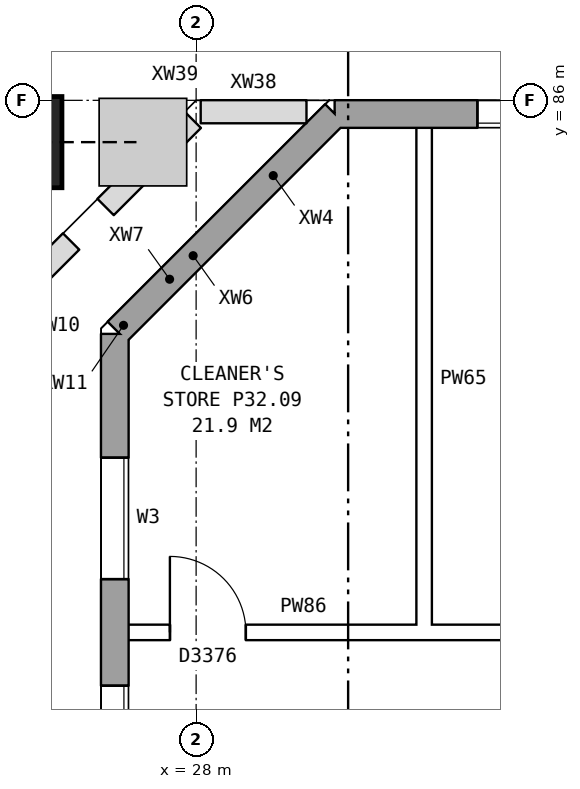
"""IFC4 building model, lengths in metres.
Left out: names, types, materials, properties, quantities, classifications, styles, units other than length and angle.
Written with IfcOpenShell. Run it as: python <this file> out.ifc"""

import sys

from ifc_helpers import new_model, si_unit, direction, frame, frame_2d, origin, origin_2d, place, context, subcontext, project, spatial, rectangle, hollow_rectangle, extrude, element, fill, save


model = new_model("IFC4")
c1 = context("Model", 3, precision=1e-05, world=origin(), true_north=direction((0.0, 1.0)))
c2 = subcontext(c1, "Body", "Model", "MODEL_VIEW")
j1 = project(units=[si_unit("LENGTHUNIT", "METRE"), si_unit("PLANEANGLEUNIT", "RADIAN")], contexts=[c1])
p1 = place(None, origin())
s1 = spatial("IfcSite", under=j1, at=p1, CompositionType="ELEMENT")
p2 = place(p1, origin())
s2 = spatial("IfcBuilding", under=s1, at=p2, CompositionType="ELEMENT")
p3 = place(p2, frame((0.0, 0.0, 115.0)))
s3 = spatial("IfcBuildingStorey", under=s2, at=p3, CompositionType="ELEMENT", Elevation=115.0)
p4 = place(p3, frame((25.635, 85.45, 0.218), z_axis=(0.362446261155, 0.0, 0.932004671541), x_axis=(0.0, 1.0, 0.0)))
e1 = element("IfcColumn", 1, at=p4, inside=s3, PredefinedType="COLUMN", context=c2, shape_type="SweptSolid", body=[
    extrude(hollow_rectangle(XDim=1.2, YDim=1.2, WallThickness=0.065, at=origin_2d()), origin(), (0.0, 0.0, 1.0), 4.362),
])
p5 = place(p3, frame((72.925, 85.82, 0.0), z_axis=(0.0, 0.0, 1.0), x_axis=(-1.0, 0.0, 0.0)))
e2 = element("IfcWall", 2, at=p5, inside=s3, PredefinedType="STANDARD", context=c2, shape_type="SweptSolid", body=[
    extrude(rectangle(XDim=43.101, YDim=0.36, at=frame_2d((21.55, 0.0))), origin(), (0.0, 0.0, 1.0), 4.2),
])
p6 = place(p5, frame((2.6, 0.0, 1.5)))
e3 = element("IfcOpeningElement", 3, at=p6, cuts=e2, PredefinedType="OPENING", context=c2, shape_type="SweptSolid", body=[
    extrude(rectangle(XDim=0.6, YDim=1.2, at=frame_2d((0.3, 0.6))), frame((0.0, 0.19, 0.0), z_axis=(0.0, -1.0, 0.0), x_axis=(1.0, 0.0, 0.0)), (0.0, 0.0, 1.0), 0.38),
])
p7 = place(p5, frame((3.625, 0.0, 1.5)))
e4 = element("IfcOpeningElement", 4, at=p7, cuts=e2, PredefinedType="OPENING", context=c2, shape_type="SweptSolid", body=[
    extrude(rectangle(XDim=1.6, YDim=1.2, at=frame_2d((0.8, 0.6))), frame((0.0, 0.19, 0.0), z_axis=(0.0, -1.0, 0.0), x_axis=(1.0, 0.0, 0.0)), (0.0, 0.0, 1.0), 0.38),
])
p8 = place(p5, frame((7.6, 0.0, 1.5)))
e5 = element("IfcOpeningElement", 5, at=p8, cuts=e2, PredefinedType="OPENING", context=c2, shape_type="SweptSolid", body=[
    extrude(rectangle(XDim=0.9, YDim=1.2, at=frame_2d((0.45, 0.6))), frame((0.0, 0.19, 0.0), z_axis=(0.0, -1.0, 0.0), x_axis=(1.0, 0.0, 0.0)), (0.0, 0.0, 1.0), 0.38),
])
p9 = place(p5, frame((9.625, 0.0, 1.5)))
e6 = element("IfcOpeningElement", 6, at=p9, cuts=e2, PredefinedType="OPENING", context=c2, shape_type="SweptSolid", body=[
    extrude(rectangle(XDim=1.6, YDim=1.2, at=frame_2d((0.8, 0.6))), frame((0.0, 0.19, 0.0), z_axis=(0.0, -1.0, 0.0), x_axis=(1.0, 0.0, 0.0)), (0.0, 0.0, 1.0), 0.38),
])
p10 = place(p5, frame((11.525, 0.0, 1.5)))
e7 = element("IfcOpeningElement", 7, at=p10, cuts=e2, PredefinedType="OPENING", context=c2, shape_type="SweptSolid", body=[
    extrude(rectangle(XDim=0.6, YDim=1.2, at=frame_2d((0.3, 0.6))), frame((0.0, 0.19, 0.0), z_axis=(0.0, -1.0, 0.0), x_axis=(1.0, 0.0, 0.0)), (0.0, 0.0, 1.0), 0.38),
])
p11 = place(p5, frame((15.625, 0.0, 1.5)))
e8 = element("IfcOpeningElement", 8, at=p11, cuts=e2, PredefinedType="OPENING", context=c2, shape_type="SweptSolid", body=[
    extrude(rectangle(XDim=1.6, YDim=1.2, at=frame_2d((0.8, 0.6))), frame((0.0, 0.19, 0.0), z_axis=(0.0, -1.0, 0.0), x_axis=(1.0, 0.0, 0.0)), (0.0, 0.0, 1.0), 0.38),
])
p12 = place(p5, frame((20.075, 0.0, 1.5)))
e9 = element("IfcOpeningElement", 9, at=p12, cuts=e2, PredefinedType="OPENING", context=c2, shape_type="SweptSolid", body=[
    extrude(rectangle(XDim=1.2, YDim=1.2, at=frame_2d((0.6, 0.6))), frame((0.0, 0.19, 0.0), z_axis=(0.0, -1.0, 0.0), x_axis=(1.0, 0.0, 0.0)), (0.0, 0.0, 1.0), 0.38),
])
p13 = place(p5, frame((21.625, 0.0, 1.5)))
e10 = element("IfcOpeningElement", 10, at=p13, cuts=e2, PredefinedType="OPENING", context=c2, shape_type="SweptSolid", body=[
    extrude(rectangle(XDim=1.6, YDim=1.2, at=frame_2d((0.8, 0.6))), frame((0.0, 0.19, 0.0), z_axis=(0.0, -1.0, 0.0), x_axis=(1.0, 0.0, 0.0)), (0.0, 0.0, 1.0), 0.38),
])
p14 = place(p5, frame((24.125, 0.0, 1.5)))
e11 = element("IfcOpeningElement", 11, at=p14, cuts=e2, PredefinedType="OPENING", context=c2, shape_type="SweptSolid", body=[
    extrude(rectangle(XDim=0.6, YDim=1.2, at=frame_2d((0.3, 0.6))), frame((0.0, 0.19, 0.0), z_axis=(0.0, -1.0, 0.0), x_axis=(1.0, 0.0, 0.0)), (0.0, 0.0, 1.0), 0.38),
])
p15 = place(p5, frame((27.625, 0.0, 1.5)))
e12 = element("IfcOpeningElement", 12, at=p15, cuts=e2, PredefinedType="OPENING", context=c2, shape_type="SweptSolid", body=[
    extrude(rectangle(XDim=1.6, YDim=1.2, at=frame_2d((0.8, 0.6))), frame((0.0, 0.19, 0.0), z_axis=(0.0, -1.0, 0.0), x_axis=(1.0, 0.0, 0.0)), (0.0, 0.0, 1.0), 0.38),
])
p16 = place(p5, frame((32.525, 0.0, 1.5)))
e13 = element("IfcOpeningElement", 13, at=p16, cuts=e2, PredefinedType="OPENING", context=c2, shape_type="SweptSolid", body=[
    extrude(rectangle(XDim=0.6, YDim=1.2, at=frame_2d((0.3, 0.6))), frame((0.0, 0.19, 0.0), z_axis=(0.0, -1.0, 0.0), x_axis=(1.0, 0.0, 0.0)), (0.0, 0.0, 1.0), 0.38),
])
p17 = place(p5, frame((33.625, 0.0, 1.5)))
e14 = element("IfcOpeningElement", 14, at=p17, cuts=e2, PredefinedType="OPENING", context=c2, shape_type="SweptSolid", body=[
    extrude(rectangle(XDim=1.6, YDim=1.2, at=frame_2d((0.8, 0.6))), frame((0.0, 0.19, 0.0), z_axis=(0.0, -1.0, 0.0), x_axis=(1.0, 0.0, 0.0)), (0.0, 0.0, 1.0), 0.38),
])
p18 = place(p5, frame((36.125, 0.0, 1.5)))
e15 = element("IfcOpeningElement", 15, at=p18, cuts=e2, PredefinedType="OPENING", context=c2, shape_type="SweptSolid", body=[
    extrude(rectangle(XDim=0.9, YDim=1.2, at=frame_2d((0.45, 0.6))), frame((0.0, 0.19, 0.0), z_axis=(0.0, -1.0, 0.0), x_axis=(1.0, 0.0, 0.0)), (0.0, 0.0, 1.0), 0.38),
])
p19 = place(p5, frame((39.625, 0.0, 1.5)))
e16 = element("IfcOpeningElement", 16, at=p19, cuts=e2, PredefinedType="OPENING", context=c2, shape_type="SweptSolid", body=[
    extrude(rectangle(XDim=1.6, YDim=1.2, at=frame_2d((0.8, 0.6))), frame((0.0, 0.19, 0.0), z_axis=(0.0, -1.0, 0.0), x_axis=(1.0, 0.0, 0.0)), (0.0, 0.0, 1.0), 0.38),
])
p20 = place(p3, frame((29.825, 85.82, 0.0), z_axis=(0.0, 0.0, 1.0), x_axis=(-0.707106781187, -0.707106781187, 0.0)))
e17 = element("IfcWall", 17, at=p20, inside=s3, PredefinedType="STANDARD", context=c2, shape_type="SweptSolid", body=[
    extrude(rectangle(XDim=2.291, YDim=0.36, at=frame_2d((1.146, 0.0))), origin(), (0.0, 0.0, 1.0), 4.2),
])
p21 = place(p3, frame((28.205, 84.2, 0.0), z_axis=(0.0, 0.0, 1.0), x_axis=(-0.707106781187, -0.707106781187, 0.0)))
e18 = element("IfcWall", 18, at=p21, inside=s3, PredefinedType="STANDARD", context=c2, shape_type="SweptSolid", body=[
    extrude(rectangle(XDim=0.69, YDim=0.36, at=frame_2d((0.345, 0.0))), origin(), (0.0, 0.0, 1.0), 3.397),
])
p22 = place(p3, frame((27.717, 83.712, 0.0), z_axis=(0.0, 0.0, 1.0), x_axis=(-0.707106781187, -0.707106781187, 0.0)))
e19 = element("IfcWall", 19, at=p22, inside=s3, PredefinedType="STANDARD", context=c2, shape_type="SweptSolid", body=[
    extrude(rectangle(XDim=0.186, YDim=0.36, at=frame_2d((0.093, 0.0))), origin(), (0.0, 0.0, 1.0), 4.2),
])
p23 = place(p3, frame((27.585, 83.581, 0.953), z_axis=(0.0, 0.0, 1.0), x_axis=(-0.707106781187, -0.707106781187, 0.0)))
e20 = element("IfcWall", 20, at=p23, inside=s3, PredefinedType="STANDARD", context=c2, shape_type="SweptSolid", body=[
    extrude(rectangle(XDim=0.652, YDim=0.36, at=frame_2d((0.326, 0.0))), origin(), (0.0, 0.0, 1.0), 3.247),
])
p24 = place(p3, frame((27.124, 83.119, 0.0), z_axis=(0.0, 0.0, 1.0), x_axis=(-0.707106781187, -0.707106781187, 0.0)))
e21 = element("IfcWall", 21, at=p24, inside=s3, PredefinedType="STANDARD", context=c2, shape_type="SweptSolid", body=[
    extrude(rectangle(XDim=0.224, YDim=0.36, at=frame_2d((0.112, 0.0))), origin(), (0.0, 0.0, 1.0), 4.2),
])
p25 = place(p3, frame((26.93, 82.925, 0.0), z_axis=(0.0, 0.0, 1.0), x_axis=(0.0, -1.0, 0.0)))
e22 = element("IfcWall", 22, at=p25, inside=s3, PredefinedType="STANDARD", context=c2, shape_type="SweptSolid", body=[
    extrude(rectangle(XDim=25.851, YDim=0.36, at=frame_2d((12.925, 0.0))), origin(), (0.0, 0.0, 1.0), 4.2),
])
p26 = place(p25, frame((1.625, 0.0, 1.5)))
e23 = element("IfcOpeningElement", 23, at=p26, cuts=e22, PredefinedType="OPENING", context=c2, shape_type="SweptSolid", body=[
    extrude(rectangle(XDim=1.6, YDim=1.2, at=frame_2d((0.8, 0.6))), frame((0.0, 0.19, 0.0), z_axis=(0.0, -1.0, 0.0), x_axis=(1.0, 0.0, 0.0)), (0.0, 0.0, 1.0), 0.38),
])
p27 = place(p25, frame((4.625, 0.0, 1.5)))
e24 = element("IfcOpeningElement", 24, at=p27, cuts=e22, PredefinedType="OPENING", context=c2, shape_type="SweptSolid", body=[
    extrude(rectangle(XDim=1.6, YDim=1.2, at=frame_2d((0.8, 0.6))), frame((0.0, 0.19, 0.0), z_axis=(0.0, -1.0, 0.0), x_axis=(1.0, 0.0, 0.0)), (0.0, 0.0, 1.0), 0.38),
])
p28 = place(p25, frame((8.775, 0.0, 1.5)))
e25 = element("IfcOpeningElement", 25, at=p28, cuts=e22, PredefinedType="OPENING", context=c2, shape_type="SweptSolid", body=[
    extrude(rectangle(XDim=0.6, YDim=1.2, at=frame_2d((0.3, 0.6))), frame((0.0, 0.19, 0.0), z_axis=(0.0, -1.0, 0.0), x_axis=(1.0, 0.0, 0.0)), (0.0, 0.0, 1.0), 0.38),
])
p29 = place(p25, frame((9.675, 0.0, 1.5)))
e26 = element("IfcOpeningElement", 26, at=p29, cuts=e22, PredefinedType="OPENING", context=c2, shape_type="SweptSolid", body=[
    extrude(rectangle(XDim=1.2, YDim=1.2, at=frame_2d((0.6, 0.6))), frame((0.0, 0.19, 0.0), z_axis=(0.0, -1.0, 0.0), x_axis=(1.0, 0.0, 0.0)), (0.0, 0.0, 1.0), 0.38),
])
p30 = place(p25, frame((13.625, 0.0, 1.5)))
e27 = element("IfcOpeningElement", 27, at=p30, cuts=e22, PredefinedType="OPENING", context=c2, shape_type="SweptSolid", body=[
    extrude(rectangle(XDim=1.6, YDim=1.2, at=frame_2d((0.8, 0.6))), frame((0.0, 0.19, 0.0), z_axis=(0.0, -1.0, 0.0), x_axis=(1.0, 0.0, 0.0)), (0.0, 0.0, 1.0), 0.38),
])
p31 = place(p25, frame((16.625, 0.0, 1.5)))
e28 = element("IfcOpeningElement", 28, at=p31, cuts=e22, PredefinedType="OPENING", context=c2, shape_type="SweptSolid", body=[
    extrude(rectangle(XDim=1.6, YDim=1.2, at=frame_2d((0.8, 0.6))), frame((0.0, 0.19, 0.0), z_axis=(0.0, -1.0, 0.0), x_axis=(1.0, 0.0, 0.0)), (0.0, 0.0, 1.0), 0.38),
])
p32 = place(p25, frame((21.125, 0.0, 1.5)))
e29 = element("IfcOpeningElement", 29, at=p32, cuts=e22, PredefinedType="OPENING", context=c2, shape_type="SweptSolid", body=[
    extrude(rectangle(XDim=0.6, YDim=1.2, at=frame_2d((0.3, 0.6))), frame((0.0, 0.19, 0.0), z_axis=(0.0, -1.0, 0.0), x_axis=(1.0, 0.0, 0.0)), (0.0, 0.0, 1.0), 0.38),
])
p33 = place(p25, frame((22.325, 0.0, 1.5)))
e30 = element("IfcOpeningElement", 30, at=p33, cuts=e22, PredefinedType="OPENING", context=c2, shape_type="SweptSolid", body=[
    extrude(rectangle(XDim=0.9, YDim=1.2, at=frame_2d((0.45, 0.6))), frame((0.0, 0.19, 0.0), z_axis=(0.0, -1.0, 0.0), x_axis=(1.0, 0.0, 0.0)), (0.0, 0.0, 1.0), 0.38),
])
p34 = place(p25, frame((15.525, 0.0, 1.5)))
e31 = element("IfcOpeningElement", 31, at=p34, cuts=e22, PredefinedType="OPENING", context=c2, shape_type="SweptSolid", body=[
    extrude(rectangle(XDim=0.6, YDim=1.2, at=frame_2d((0.3, 0.6))), frame((0.0, 0.19, 0.0), z_axis=(0.0, -1.0, 0.0), x_axis=(1.0, 0.0, 0.0)), (0.0, 0.0, 1.0), 0.38),
])
p35 = place(p3, frame((29.45, 85.85, 0.0), z_axis=(0.0, 0.0, 1.0), x_axis=(-1.0, 0.0, 0.0)))
e32 = element("IfcWall", 32, at=p35, inside=s3, PredefinedType="PARAPET", context=c2, shape_type="SweptSolid", body=[
    extrude(rectangle(XDim=1.388, YDim=0.3, at=frame_2d((0.694, 0.0))), origin(), (0.0, 0.0, 1.0), 1.1),
])
p36 = place(p3, frame((27.955, 85.742, 0.0), z_axis=(0.0, 0.0, 1.0), x_axis=(-0.707106781187, -0.707106781187, 0.0)))
e33 = element("IfcWall", 33, at=p36, inside=s3, PredefinedType="PARAPET", context=c2, shape_type="SweptSolid", body=[
    extrude(rectangle(XDim=1.618, YDim=0.3, at=frame_2d((0.809, 0.0))), origin(), (0.0, 0.0, 1.0), 1.1),
])
p37 = place(p3, frame((26.354, 84.142, 0.0), z_axis=(0.0, 0.0, 1.0), x_axis=(-0.707178484961, -0.70703507014, 0.0)))
e34 = element("IfcWall", 34, at=p37, inside=s3, PredefinedType="PARAPET", context=c2, shape_type="SweptSolid", body=[
    extrude(rectangle(XDim=1.702, YDim=0.3, at=frame_2d((0.851, 0.0))), origin(), (0.0, 0.0, 1.0), 1.1),
])
p38 = place(p3, frame((30.9, 79.0, 0.0), z_axis=(0.0, 0.0, 1.0), x_axis=(1.0, 0.0, 0.0)))
e35 = element("IfcWall", 35, at=p38, inside=s3, PredefinedType="PARTITIONING", context=c2, shape_type="SweptSolid", body=[
    extrude(rectangle(XDim=44.86, YDim=0.2, at=frame_2d((22.43, 0.0))), origin(), (0.0, 0.0, 1.0), 4.2),
])
p39 = place(p38, frame((2.6, 0.0, 0.0)))
e36 = element("IfcOpeningElement", 36, at=p39, cuts=e35, PredefinedType="OPENING", context=c2, shape_type="SweptSolid", body=[
    extrude(rectangle(XDim=1.0, YDim=2.1, at=frame_2d((0.5, 1.05))), frame((0.0, 0.11, 0.0), z_axis=(0.0, -1.0, 0.0), x_axis=(1.0, 0.0, 0.0)), (0.0, 0.0, 1.0), 0.22),
])
p40 = place(p38, frame((9.5, 0.0, 0.0)))
e37 = element("IfcOpeningElement", 37, at=p40, cuts=e35, PredefinedType="OPENING", context=c2, shape_type="SweptSolid", body=[
    extrude(rectangle(XDim=1.0, YDim=2.1, at=frame_2d((0.5, 1.05))), frame((0.0, 0.11, 0.0), z_axis=(0.0, -1.0, 0.0), x_axis=(1.0, 0.0, 0.0)), (0.0, 0.0, 1.0), 0.22),
])
p41 = place(p38, frame((14.6, 0.0, 0.0)))
e38 = element("IfcOpeningElement", 38, at=p41, cuts=e35, PredefinedType="OPENING", context=c2, shape_type="SweptSolid", body=[
    extrude(rectangle(XDim=1.0, YDim=2.1, at=frame_2d((0.5, 1.05))), frame((0.0, 0.11, 0.0), z_axis=(0.0, -1.0, 0.0), x_axis=(1.0, 0.0, 0.0)), (0.0, 0.0, 1.0), 0.22),
])
p42 = place(p38, frame((22.1, 0.0, 0.0)))
e39 = element("IfcOpeningElement", 39, at=p42, cuts=e35, PredefinedType="OPENING", context=c2, shape_type="SweptSolid", body=[
    extrude(rectangle(XDim=1.0, YDim=2.1, at=frame_2d((0.5, 1.05))), frame((0.0, 0.11, 0.0), z_axis=(0.0, -1.0, 0.0), x_axis=(1.0, 0.0, 0.0)), (0.0, 0.0, 1.0), 0.22),
])
p43 = place(p38, frame((29.6, 0.0, 0.0)))
e40 = element("IfcOpeningElement", 40, at=p43, cuts=e35, PredefinedType="OPENING", context=c2, shape_type="SweptSolid", body=[
    extrude(rectangle(XDim=1.0, YDim=2.1, at=frame_2d((0.5, 1.05))), frame((0.0, 0.11, 0.0), z_axis=(0.0, -1.0, 0.0), x_axis=(1.0, 0.0, 0.0)), (0.0, 0.0, 1.0), 0.22),
])
p44 = place(p38, frame((38.42, 0.0, 0.0)))
e41 = element("IfcOpeningElement", 41, at=p44, cuts=e35, PredefinedType="OPENING", context=c2, shape_type="SweptSolid", body=[
    extrude(rectangle(XDim=1.0, YDim=2.1, at=frame_2d((0.5, 1.05))), frame((0.0, 0.11, 0.0), z_axis=(0.0, -1.0, 0.0), x_axis=(1.0, 0.0, 0.0)), (0.0, 0.0, 1.0), 0.22),
])
p45 = place(p3, frame((26.99, 79.0, 0.0), z_axis=(0.0, 0.0, 1.0), x_axis=(1.0, 0.0, 0.0)))
e42 = element("IfcWall", 42, at=p45, inside=s3, PredefinedType="PARTITIONING", context=c2, shape_type="SweptSolid", body=[
    extrude(rectangle(XDim=4.11, YDim=0.2, at=frame_2d((2.055, 0.0))), origin(), (0.0, 0.0, 1.0), 4.2),
])
p46 = place(p45, frame((0.665, 0.0, 0.0)))
e43 = element("IfcOpeningElement", 43, at=p46, cuts=e42, PredefinedType="OPENING", context=c2, shape_type="SweptSolid", body=[
    extrude(rectangle(XDim=1.0, YDim=2.1, at=frame_2d((0.5, 1.05))), frame((0.0, 0.11, 0.0), z_axis=(0.0, -1.0, 0.0), x_axis=(1.0, 0.0, 0.0)), (0.0, 0.0, 1.0), 0.22),
])
p47 = place(p3, frame((31.0, 78.9, 0.0), z_axis=(0.0, 0.0, 1.0), x_axis=(0.0, 1.0, 0.0)))
e44 = element("IfcWall", 44, at=p47, inside=s3, PredefinedType="PARTITIONING", context=c2, shape_type="SweptSolid", body=[
    extrude(rectangle(XDim=6.86, YDim=0.2, at=frame_2d((3.43, 0.0))), origin(), (0.0, 0.0, 1.0), 4.2),
])
p48 = place(p19, origin())
e45 = element("IfcWindow", 45, at=p48, inside=s3, PartitioningType="DOUBLE_PANEL_HORIZONTAL", PredefinedType="WINDOW", context=c2, shape_type="SweptSolid", body=[
    extrude(rectangle(XDim=1.6, YDim=1.2, at=frame_2d((0.8, 0.6))), frame((0.0, 0.15, 0.0), z_axis=(0.0, -1.0, 0.0), x_axis=(1.0, 0.0, 0.0)), (0.0, 0.0, 1.0), 0.06),
])
fill(e16, e45)
p49 = place(p26, origin())
e46 = element("IfcWindow", 46, at=p49, inside=s3, PartitioningType="DOUBLE_PANEL_HORIZONTAL", PredefinedType="WINDOW", context=c2, shape_type="SweptSolid", body=[
    extrude(rectangle(XDim=1.6, YDim=1.2, at=frame_2d((0.8, 0.6))), frame((0.0, 0.15, 0.0), z_axis=(0.0, -1.0, 0.0), x_axis=(1.0, 0.0, 0.0)), (0.0, 0.0, 1.0), 0.06),
])
fill(e23, e46)
p50 = place(p27, origin())
e47 = element("IfcWindow", 47, at=p50, inside=s3, PartitioningType="DOUBLE_PANEL_HORIZONTAL", PredefinedType="WINDOW", context=c2, shape_type="SweptSolid", body=[
    extrude(rectangle(XDim=1.6, YDim=1.2, at=frame_2d((0.8, 0.6))), frame((0.0, 0.15, 0.0), z_axis=(0.0, -1.0, 0.0), x_axis=(1.0, 0.0, 0.0)), (0.0, 0.0, 1.0), 0.06),
])
fill(e24, e47)
p51 = place(p46, origin())
e48 = element("IfcDoor", 48, at=p51, inside=s3, OperationType="SINGLE_SWING_LEFT", PredefinedType="DOOR", context=c2, shape_type="SweptSolid", body=[
    extrude(rectangle(XDim=1.0, YDim=2.1, at=frame_2d((0.5, 1.05))), frame((0.0, 0.025, 0.0), z_axis=(0.0, -1.0, 0.0), x_axis=(1.0, 0.0, 0.0)), (0.0, 0.0, 1.0), 0.05),
])
fill(e43, e48)
save(model, sys.argv[1])
